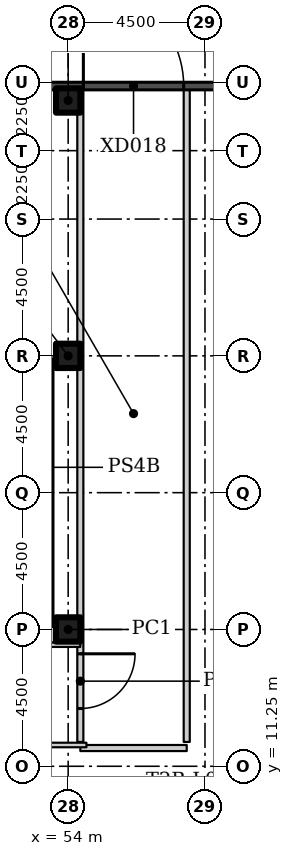
"""IFC4 building model, lengths in metres.
Left out: names, types, materials, properties, quantities, classifications, styles, units other than length and angle.
Written with IfcOpenShell. Run it as: python <this file> out.ifc"""

import sys

from ifc_helpers import new_model, si_unit, direction, frame, frame_2d, origin, origin_2d, place, context, subcontext, project, spatial, rectangle, hollow_rectangle, extrude, element, fill, save


model = new_model("IFC4")
c1 = context("Model", 3, precision=1e-05, world=origin(), true_north=direction((0.0, 1.0)))
c2 = subcontext(c1, "Body", "Model", "MODEL_VIEW")
j1 = project(units=[si_unit("LENGTHUNIT", "METRE"), si_unit("PLANEANGLEUNIT", "RADIAN")], contexts=[c1])
p1 = place(None, origin())
s1 = spatial("IfcSite", under=j1, at=p1, CompositionType="ELEMENT")
p2 = place(p1, origin())
s2 = spatial("IfcBuilding", under=s1, at=p2, CompositionType="ELEMENT")
p3 = place(p2, origin())
s3 = spatial("IfcBuildingStorey", under=s2, at=p3, CompositionType="ELEMENT", Elevation=0.0)
for number, where in (
    (1, (54.0, 15.75, 0.0)),
    (2, (54.0, 24.75, 0.0)),
    (3, (54.0, 33.15, 0.0)),
):
    element("IfcColumn", number, at=place(p3, frame(where)), inside=s3, PredefinedType="COLUMN", context=c2, shape_type="SweptSolid", body=[
        extrude(hollow_rectangle(XDim=0.8, YDim=0.8, WallThickness=0.03, at=origin_2d()), origin(), (0.0, 0.0, 1.0), 6.1),
    ])
p4 = place(p3, frame((54.4, 11.85, 0.0)))
e4 = element("IfcWall", 4, at=p4, inside=s3, PredefinedType="PARTITIONING", context=c2, shape_type="SweptSolid", body=[
    extrude(rectangle(XDim=3.5, YDim=0.2, at=frame_2d((1.75, 0.0))), origin(), (0.0, 0.0, 1.0), 6.1),
])
p5 = place(p3, frame((54.4, 33.655, 0.0), z_axis=(0.0, 0.0, 1.0), x_axis=(0.0, -1.0, 0.0)))
e5 = element("IfcWall", 5, at=p5, inside=s3, PredefinedType="PARTITIONING", context=c2, shape_type="SweptSolid", body=[
    extrude(rectangle(XDim=21.605, YDim=0.2, at=frame_2d((10.802, 0.0))), origin(), (0.0, 0.0, 1.0), 6.1),
])
p6 = place(p5, frame((18.705, 0.0, 0.0)))
e6 = element("IfcOpeningElement", 6, at=p6, cuts=e5, PredefinedType="OPENING", context=c2, shape_type="SweptSolid", body=[
    extrude(rectangle(XDim=1.8, YDim=2.1, at=frame_2d((0.9, 1.05))), frame((0.0, 0.11, 0.0), z_axis=(0.0, -1.0, 0.0), x_axis=(1.0, 0.0, 0.0)), (0.0, 0.0, 1.0), 0.22),
])
p7 = place(p3, frame((57.9, 12.05, 0.0), z_axis=(0.0, 0.0, 1.0), x_axis=(0.0, 1.0, 0.0)))
e7 = element("IfcWall", 7, at=p7, inside=s3, PredefinedType="PARTITIONING", context=c2, shape_type="SweptSolid", body=[
    extrude(rectangle(XDim=21.605, YDim=0.2, at=frame_2d((10.802, 0.0))), origin(), (0.0, 0.0, 1.0), 6.1),
])
p8 = place(p3, frame((45.425, 11.95, 0.0)))
e8 = element("IfcWall", 8, at=p8, inside=s3, PredefinedType="PARTITIONING", context=c2, shape_type="SweptSolid", body=[
    extrude(rectangle(XDim=9.175, YDim=0.15, at=frame_2d((4.587, 0.0))), origin(), (0.0, 0.0, 1.0), 6.1),
])
p9 = place(p8, frame((3.175, 0.0, 0.0)))
e9 = element("IfcOpeningElement", 9, at=p9, cuts=e8, PredefinedType="OPENING", context=c2, shape_type="SweptSolid", body=[
    extrude(rectangle(XDim=1.8, YDim=2.4, at=frame_2d((0.9, 1.2))), frame((0.0, 0.085, 0.0), z_axis=(0.0, -1.0, 0.0), x_axis=(1.0, 0.0, 0.0)), (0.0, 0.0, 1.0), 0.17),
])
p10 = place(p3, frame((54.4, 15.25, 0.0), z_axis=(0.0, 0.0, 1.0), x_axis=(-1.0, 0.0, 0.0)))
e10 = element("IfcWall", 10, at=p10, inside=s3, PredefinedType="PARTITIONING", context=c2, shape_type="SweptSolid", body=[
    extrude(rectangle(XDim=0.975, YDim=0.15, at=frame_2d((0.487, 0.0))), origin(), (0.0, 0.0, 1.0), 6.1),
])
p11 = place(p3, frame((53.5, 15.325, 0.0), z_axis=(0.0, 0.0, 1.0), x_axis=(0.0, 1.0, 0.0)))
e11 = element("IfcWall", 11, at=p11, inside=s3, PredefinedType="PARTITIONING", context=c2, shape_type="SweptSolid", body=[
    extrude(rectangle(XDim=0.525, YDim=0.15, at=frame_2d((0.262, 0.0))), origin(), (0.0, 0.0, 1.0), 6.1),
])
p12 = place(p3, frame((-67.5, 33.625, 0.0)))
e12 = element("IfcWall", 12, at=p12, inside=s3, PredefinedType="SOLIDWALL", context=c2, shape_type="SweptSolid", body=[
    extrude(rectangle(XDim=130.5, YDim=0.25, at=frame_2d((65.25, 0.0))), origin(), (0.0, 0.0, 1.0), 6.15),
])
p13 = place(p12, frame((28.65, 0.0, 0.0)))
e13 = element("IfcOpeningElement", 13, at=p13, cuts=e12, PredefinedType="OPENING", context=c2, shape_type="SweptSolid", body=[
    extrude(rectangle(XDim=1.2, YDim=2.4, at=frame_2d((0.6, 1.2))), frame((0.0, 0.135, 0.0), z_axis=(0.0, -1.0, 0.0), x_axis=(1.0, 0.0, 0.0)), (0.0, 0.0, 1.0), 0.27),
])
p14 = place(p12, frame((37.25, 0.0, 0.0)))
e14 = element("IfcOpeningElement", 14, at=p14, cuts=e12, PredefinedType="OPENING", context=c2, shape_type="SweptSolid", body=[
    extrude(rectangle(XDim=2.0, YDim=2.4, at=frame_2d((1.0, 1.2))), frame((0.0, 0.135, 0.0), z_axis=(0.0, -1.0, 0.0), x_axis=(1.0, 0.0, 0.0)), (0.0, 0.0, 1.0), 0.27),
])
p15 = place(p12, frame((100.25, 0.0, 0.0)))
e15 = element("IfcOpeningElement", 15, at=p15, cuts=e12, PredefinedType="OPENING", context=c2, shape_type="SweptSolid", body=[
    extrude(rectangle(XDim=2.0, YDim=2.4, at=frame_2d((1.0, 1.2))), frame((0.0, 0.135, 0.0), z_axis=(0.0, -1.0, 0.0), x_axis=(1.0, 0.0, 0.0)), (0.0, 0.0, 1.0), 0.27),
])
p16 = place(p12, frame((55.25, 0.0, 0.0)))
e16 = element("IfcOpeningElement", 16, at=p16, cuts=e12, PredefinedType="OPENING", context=c2, shape_type="SweptSolid", body=[
    extrude(rectangle(XDim=2.0, YDim=2.4, at=frame_2d((1.0, 1.2))), frame((0.0, 0.135, 0.0), z_axis=(0.0, -1.0, 0.0), x_axis=(1.0, 0.0, 0.0)), (0.0, 0.0, 1.0), 0.27),
])
p17 = place(p12, frame((68.75, 0.0, 0.0)))
e17 = element("IfcOpeningElement", 17, at=p17, cuts=e12, PredefinedType="OPENING", context=c2, shape_type="SweptSolid", body=[
    extrude(rectangle(XDim=2.0, YDim=2.4, at=frame_2d((1.0, 1.2))), frame((0.0, 0.135, 0.0), z_axis=(0.0, -1.0, 0.0), x_axis=(1.0, 0.0, 0.0)), (0.0, 0.0, 1.0), 0.27),
])
p18 = place(p12, frame((10.25, 0.0, 0.0)))
e18 = element("IfcOpeningElement", 18, at=p18, cuts=e12, PredefinedType="OPENING", context=c2, shape_type="SweptSolid", body=[
    extrude(rectangle(XDim=2.0, YDim=2.4, at=frame_2d((1.0, 1.2))), frame((0.0, 0.135, 0.0), z_axis=(0.0, -1.0, 0.0), x_axis=(1.0, 0.0, 0.0)), (0.0, 0.0, 1.0), 0.27),
])
p19 = place(p12, frame((5.65, 0.0, 0.0)))
e19 = element("IfcOpeningElement", 19, at=p19, cuts=e12, PredefinedType="OPENING", context=c2, shape_type="SweptSolid", body=[
    extrude(rectangle(XDim=2.2, YDim=2.4, at=frame_2d((1.1, 1.2))), frame((0.0, 0.135, 0.0), z_axis=(0.0, -1.0, 0.0), x_axis=(1.0, 0.0, 0.0)), (0.0, 0.0, 1.0), 0.27),
])
p20 = place(p12, frame((113.65, 0.0, 0.0)))
e20 = element("IfcOpeningElement", 20, at=p20, cuts=e12, PredefinedType="OPENING", context=c2, shape_type="SweptSolid", body=[
    extrude(rectangle(XDim=2.2, YDim=2.4, at=frame_2d((1.1, 1.2))), frame((0.0, 0.135, 0.0), z_axis=(0.0, -1.0, 0.0), x_axis=(1.0, 0.0, 0.0)), (0.0, 0.0, 1.0), 0.27),
])
p21 = place(p12, frame((45.45, 0.0, 0.0)))
e21 = element("IfcOpeningElement", 21, at=p21, cuts=e12, PredefinedType="OPENING", context=c2, shape_type="SweptSolid", body=[
    extrude(rectangle(XDim=3.6, YDim=4.5, at=frame_2d((1.8, 2.25))), frame((0.0, 0.135, 0.0), z_axis=(0.0, -1.0, 0.0), x_axis=(1.0, 0.0, 0.0)), (0.0, 0.0, 1.0), 0.27),
])
p22 = place(p12, frame((91.15, 0.0, 0.0)))
e22 = element("IfcOpeningElement", 22, at=p22, cuts=e12, PredefinedType="OPENING", context=c2, shape_type="SweptSolid", body=[
    extrude(rectangle(XDim=2.2, YDim=2.4, at=frame_2d((1.1, 1.2))), frame((0.0, 0.135, 0.0), z_axis=(0.0, -1.0, 0.0), x_axis=(1.0, 0.0, 0.0)), (0.0, 0.0, 1.0), 0.27),
])
p23 = place(p12, frame((23.0, 0.0, 0.0)))
e23 = element("IfcOpeningElement", 23, at=p23, cuts=e12, PredefinedType="OPENING", context=c2, shape_type="SweptSolid", body=[
    extrude(rectangle(XDim=3.3, YDim=2.4, at=frame_2d((1.65, 1.2))), frame((0.0, 0.135, 0.0), z_axis=(0.0, -1.0, 0.0), x_axis=(1.0, 0.0, 0.0)), (0.0, 0.0, 1.0), 0.27),
])
p24 = place(p12, frame((59.0, 0.0, 0.0)))
e24 = element("IfcOpeningElement", 24, at=p24, cuts=e12, PredefinedType="OPENING", context=c2, shape_type="SweptSolid", body=[
    extrude(rectangle(XDim=3.3, YDim=2.4, at=frame_2d((1.65, 1.2))), frame((0.0, 0.135, 0.0), z_axis=(0.0, -1.0, 0.0), x_axis=(1.0, 0.0, 0.0)), (0.0, 0.0, 1.0), 0.27),
])
p25 = place(p12, frame((86.0, 0.0, 0.0)))
e25 = element("IfcOpeningElement", 25, at=p25, cuts=e12, PredefinedType="OPENING", context=c2, shape_type="SweptSolid", body=[
    extrude(rectangle(XDim=3.3, YDim=2.4, at=frame_2d((1.65, 1.2))), frame((0.0, 0.135, 0.0), z_axis=(0.0, -1.0, 0.0), x_axis=(1.0, 0.0, 0.0)), (0.0, 0.0, 1.0), 0.27),
])
p26 = place(p12, frame((122.0, 0.0, 0.0)))
e26 = element("IfcOpeningElement", 26, at=p26, cuts=e12, PredefinedType="OPENING", context=c2, shape_type="SweptSolid", body=[
    extrude(rectangle(XDim=3.3, YDim=2.4, at=frame_2d((1.65, 1.2))), frame((0.0, 0.135, 0.0), z_axis=(0.0, -1.0, 0.0), x_axis=(1.0, 0.0, 0.0)), (0.0, 0.0, 1.0), 0.27),
])
p27 = place(p12, frame((127.05, 0.0, 3.0)))
e27 = element("IfcOpeningElement", 27, at=p27, cuts=e12, PredefinedType="OPENING", context=c2, shape_type="SweptSolid", body=[
    extrude(rectangle(XDim=2.4, YDim=1.2, at=frame_2d((1.2, 0.6))), frame((0.0, 0.135, 0.0), z_axis=(0.0, -1.0, 0.0), x_axis=(1.0, 0.0, 0.0)), (0.0, 0.0, 1.0), 0.27),
])
p28 = place(p12, frame((118.05, 0.0, 3.0)))
e28 = element("IfcOpeningElement", 28, at=p28, cuts=e12, PredefinedType="OPENING", context=c2, shape_type="SweptSolid", body=[
    extrude(rectangle(XDim=2.4, YDim=1.2, at=frame_2d((1.2, 0.6))), frame((0.0, 0.135, 0.0), z_axis=(0.0, -1.0, 0.0), x_axis=(1.0, 0.0, 0.0)), (0.0, 0.0, 1.0), 0.27),
])
p29 = place(p12, frame((109.05, 0.0, 3.0)))
e29 = element("IfcOpeningElement", 29, at=p29, cuts=e12, PredefinedType="OPENING", context=c2, shape_type="SweptSolid", body=[
    extrude(rectangle(XDim=2.4, YDim=1.2, at=frame_2d((1.2, 0.6))), frame((0.0, 0.135, 0.0), z_axis=(0.0, -1.0, 0.0), x_axis=(1.0, 0.0, 0.0)), (0.0, 0.0, 1.0), 0.27),
])
p30 = place(p12, frame((104.55, 0.0, 3.0)))
e30 = element("IfcOpeningElement", 30, at=p30, cuts=e12, PredefinedType="OPENING", context=c2, shape_type="SweptSolid", body=[
    extrude(rectangle(XDim=2.4, YDim=1.2, at=frame_2d((1.2, 0.6))), frame((0.0, 0.135, 0.0), z_axis=(0.0, -1.0, 0.0), x_axis=(1.0, 0.0, 0.0)), (0.0, 0.0, 1.0), 0.27),
])
p31 = place(p12, frame((95.55, 0.0, 3.0)))
e31 = element("IfcOpeningElement", 31, at=p31, cuts=e12, PredefinedType="OPENING", context=c2, shape_type="SweptSolid", body=[
    extrude(rectangle(XDim=2.4, YDim=1.2, at=frame_2d((1.2, 0.6))), frame((0.0, 0.135, 0.0), z_axis=(0.0, -1.0, 0.0), x_axis=(1.0, 0.0, 0.0)), (0.0, 0.0, 1.0), 0.27),
])
p32 = place(p12, frame((82.05, 0.0, 3.0)))
e32 = element("IfcOpeningElement", 32, at=p32, cuts=e12, PredefinedType="OPENING", context=c2, shape_type="SweptSolid", body=[
    extrude(rectangle(XDim=2.4, YDim=1.2, at=frame_2d((1.2, 0.6))), frame((0.0, 0.135, 0.0), z_axis=(0.0, -1.0, 0.0), x_axis=(1.0, 0.0, 0.0)), (0.0, 0.0, 1.0), 0.27),
])
p33 = place(p12, frame((77.55, 0.0, 3.0)))
e33 = element("IfcOpeningElement", 33, at=p33, cuts=e12, PredefinedType="OPENING", context=c2, shape_type="SweptSolid", body=[
    extrude(rectangle(XDim=2.4, YDim=1.2, at=frame_2d((1.2, 0.6))), frame((0.0, 0.135, 0.0), z_axis=(0.0, -1.0, 0.0), x_axis=(1.0, 0.0, 0.0)), (0.0, 0.0, 1.0), 0.27),
])
p34 = place(p12, frame((73.05, 0.0, 3.0)))
e34 = element("IfcOpeningElement", 34, at=p34, cuts=e12, PredefinedType="OPENING", context=c2, shape_type="SweptSolid", body=[
    extrude(rectangle(XDim=2.4, YDim=1.2, at=frame_2d((1.2, 0.6))), frame((0.0, 0.135, 0.0), z_axis=(0.0, -1.0, 0.0), x_axis=(1.0, 0.0, 0.0)), (0.0, 0.0, 1.0), 0.27),
])
p35 = place(p12, frame((64.05, 0.0, 3.0)))
e35 = element("IfcOpeningElement", 35, at=p35, cuts=e12, PredefinedType="OPENING", context=c2, shape_type="SweptSolid", body=[
    extrude(rectangle(XDim=2.4, YDim=1.2, at=frame_2d((1.2, 0.6))), frame((0.0, 0.135, 0.0), z_axis=(0.0, -1.0, 0.0), x_axis=(1.0, 0.0, 0.0)), (0.0, 0.0, 1.0), 0.27),
])
p36 = place(p12, frame((50.55, 0.0, 3.0)))
e36 = element("IfcOpeningElement", 36, at=p36, cuts=e12, PredefinedType="OPENING", context=c2, shape_type="SweptSolid", body=[
    extrude(rectangle(XDim=2.4, YDim=1.2, at=frame_2d((1.2, 0.6))), frame((0.0, 0.135, 0.0), z_axis=(0.0, -1.0, 0.0), x_axis=(1.0, 0.0, 0.0)), (0.0, 0.0, 1.0), 0.27),
])
p37 = place(p12, frame((41.55, 0.0, 3.0)))
e37 = element("IfcOpeningElement", 37, at=p37, cuts=e12, PredefinedType="OPENING", context=c2, shape_type="SweptSolid", body=[
    extrude(rectangle(XDim=2.4, YDim=1.2, at=frame_2d((1.2, 0.6))), frame((0.0, 0.135, 0.0), z_axis=(0.0, -1.0, 0.0), x_axis=(1.0, 0.0, 0.0)), (0.0, 0.0, 1.0), 0.27),
])
p38 = place(p12, frame((32.55, 0.0, 3.0)))
e38 = element("IfcOpeningElement", 38, at=p38, cuts=e12, PredefinedType="OPENING", context=c2, shape_type="SweptSolid", body=[
    extrude(rectangle(XDim=2.4, YDim=1.2, at=frame_2d((1.2, 0.6))), frame((0.0, 0.135, 0.0), z_axis=(0.0, -1.0, 0.0), x_axis=(1.0, 0.0, 0.0)), (0.0, 0.0, 1.0), 0.27),
])
p39 = place(p12, frame((19.05, 0.0, 3.0)))
e39 = element("IfcOpeningElement", 39, at=p39, cuts=e12, PredefinedType="OPENING", context=c2, shape_type="SweptSolid", body=[
    extrude(rectangle(XDim=2.4, YDim=1.2, at=frame_2d((1.2, 0.6))), frame((0.0, 0.135, 0.0), z_axis=(0.0, -1.0, 0.0), x_axis=(1.0, 0.0, 0.0)), (0.0, 0.0, 1.0), 0.27),
])
p40 = place(p12, frame((14.55, 0.0, 3.0)))
e40 = element("IfcOpeningElement", 40, at=p40, cuts=e12, PredefinedType="OPENING", context=c2, shape_type="SweptSolid", body=[
    extrude(rectangle(XDim=2.4, YDim=1.2, at=frame_2d((1.2, 0.6))), frame((0.0, 0.135, 0.0), z_axis=(0.0, -1.0, 0.0), x_axis=(1.0, 0.0, 0.0)), (0.0, 0.0, 1.0), 0.27),
])
p41 = place(p12, frame((1.05, 0.0, 3.0)))
e41 = element("IfcOpeningElement", 41, at=p41, cuts=e12, PredefinedType="OPENING", context=c2, shape_type="SweptSolid", body=[
    extrude(rectangle(XDim=2.4, YDim=1.2, at=frame_2d((1.2, 0.6))), frame((0.0, 0.135, 0.0), z_axis=(0.0, -1.0, 0.0), x_axis=(1.0, 0.0, 0.0)), (0.0, 0.0, 1.0), 0.27),
])
p42 = place(p6, origin())
e42 = element("IfcDoor", 42, at=p42, inside=s3, OperationType="DOUBLE_DOOR_SINGLE_SWING", PredefinedType="DOOR", context=c2, shape_type="SweptSolid", body=[
    extrude(rectangle(XDim=1.8, YDim=2.1, at=frame_2d((0.9, 1.05))), frame((0.0, 0.025, 0.0), z_axis=(0.0, -1.0, 0.0), x_axis=(1.0, 0.0, 0.0)), (0.0, 0.0, 1.0), 0.05),
])
fill(e6, e42)
p43 = place(p26, origin())
e43 = element("IfcDoor", 43, at=p43, inside=s3, OperationType="DOUBLE_DOOR_SINGLE_SWING", PredefinedType="DOOR", context=c2, shape_type="SweptSolid", body=[
    extrude(rectangle(XDim=3.3, YDim=2.4, at=frame_2d((1.65, 1.2))), frame((0.0, 0.025, 0.0), z_axis=(0.0, -1.0, 0.0), x_axis=(1.0, 0.0, 0.0)), (0.0, 0.0, 1.0), 0.05),
])
fill(e26, e43)
save(model, sys.argv[1])
